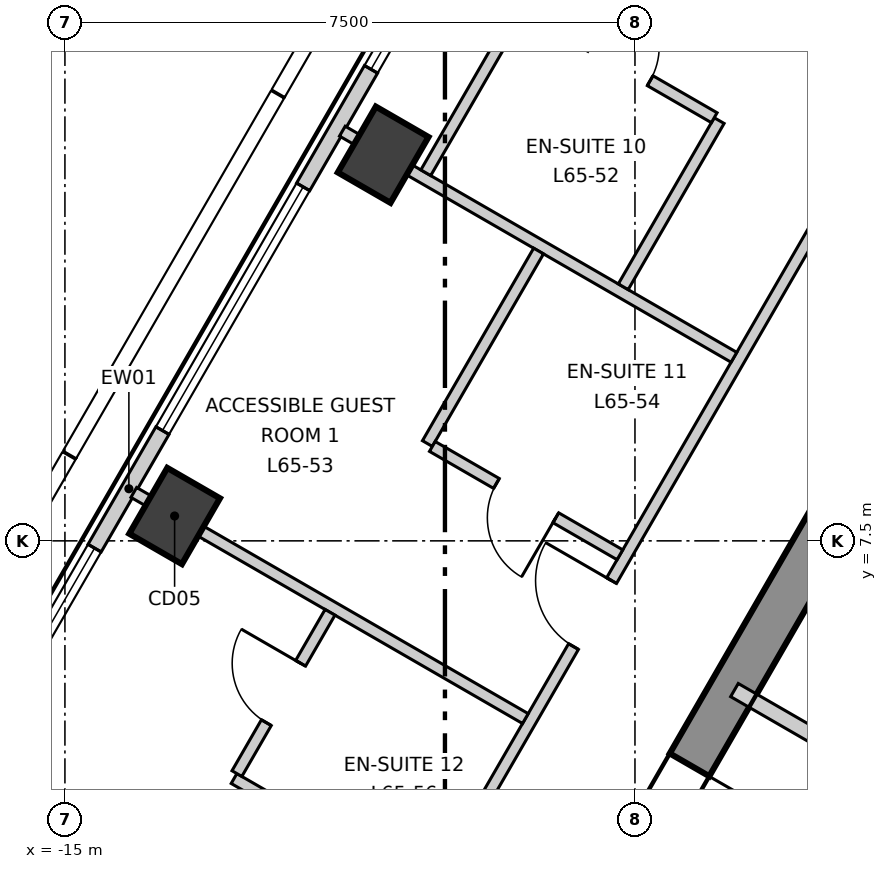
"""IFC4 building model, lengths in metres.
Left out: names, types, materials, properties, quantities, classifications, styles, units other than length and angle.
Written with IfcOpenShell. Run it as: python <this file> out.ifc"""

import sys

from ifc_helpers import new_model, si_unit, direction, frame, frame_2d, origin, origin_2d, place, context, subcontext, project, spatial, polyline, rectangle, outline, extrude, element, fill, save


model = new_model("IFC4")
c1 = context("Model", 3, precision=1e-05, world=origin(), true_north=direction((0.0, 1.0)))
c2 = subcontext(c1, "Body", "Model", "MODEL_VIEW")
j1 = project(units=[si_unit("LENGTHUNIT", "METRE"), si_unit("PLANEANGLEUNIT", "RADIAN")], contexts=[c1])
p1 = place(None, origin())
s1 = spatial("IfcSite", under=j1, at=p1, CompositionType="ELEMENT")
p2 = place(p1, origin())
s2 = spatial("IfcBuilding", under=s1, at=p2, CompositionType="ELEMENT")
p3 = place(p2, frame((0.0, 0.0, 279.1)))
s3 = spatial("IfcBuildingStorey", under=s2, at=p3, CompositionType="ELEMENT", Elevation=279.1)
p4 = place(p3, frame((-1.732, 13.3, -0.3), z_axis=(0.0, 0.0, 1.0), x_axis=(-0.500000539815, -0.866025092122, 0.0)))
e1 = element("IfcWall", 1, at=p4, inside=s3, PredefinedType="SHEAR", context=c2, shape_type="SweptSolid", body=[
    extrude(outline(polyline([(-0.173, -0.3), (1.795, -0.3), (3.763, -0.3), (5.732, -0.3), (7.7, -0.3), (9.668, -0.301), (11.637, -0.301), (13.605, -0.301), (15.573, -0.301), (17.542, -0.301), (19.51, -0.301), (21.478, -0.301), (21.131, 0.3), (19.226, 0.3), (17.321, 0.3), (15.415, 0.3), (13.51, 0.3), (11.605, 0.3), (9.699, 0.3), (7.794, 0.3), (5.889, 0.3), (3.984, 0.3), (2.078, 0.3), (0.173, 0.3), (-0.173, -0.3)])), origin(), (0.0, 0.0, 1.0), 3.6),
])
p5 = place(p4, frame((10.102, 0.0, 0.3)))
e2 = element("IfcOpeningElement", 2, at=p5, cuts=e1, PredefinedType="OPENING", context=c2, shape_type="SweptSolid", body=[
    extrude(rectangle(XDim=1.1, YDim=2.1, at=frame_2d((0.55, 1.05))), frame((0.0, 0.31, 0.0), z_axis=(0.0, -1.0, 0.0), x_axis=(1.0, 0.0, 0.0)), (0.0, 0.0, 1.0), 0.621),
])
p6 = place(p4, frame((15.627, 0.0, 0.3)))
e3 = element("IfcOpeningElement", 3, at=p6, cuts=e1, PredefinedType="OPENING", context=c2, shape_type="SweptSolid", body=[
    extrude(rectangle(XDim=0.9, YDim=2.1, at=frame_2d((0.45, 1.05))), frame((0.0, 0.31, 0.0), z_axis=(0.0, -1.0, 0.0), x_axis=(1.0, 0.0, 0.0)), (0.0, 0.0, 1.0), 0.621),
])
for number, where, z_axis, x_axis in (
    (4, (-10.813, 12.58, -0.3), (0.0, 0.0, 1.0), (0.5, 0.866, 0.0)),
    (5, (-13.557, 7.827, -0.3), (0.0, 0.0, 1.0), (0.5, 0.866, 0.0)),
):
    element("IfcColumn", number, at=place(p3, frame(where, z_axis=z_axis, x_axis=x_axis)), inside=s3, PredefinedType="COLUMN", context=c2, shape_type="SweptSolid", body=[
        extrude(rectangle(XDim=1.0, YDim=0.8, at=origin_2d()), origin(), (0.0, 0.0, 1.0), 3.6),
    ])
p7 = place(p3, frame((-2.536, 28.316, 0.0), z_axis=(0.0, 0.0, 1.0), x_axis=(-0.500006870765, -0.86602143691, 0.0)))
e6 = element("IfcWall", 6, at=p7, inside=s3, PredefinedType="ELEMENTEDWALL", context=c2, shape_type="SweptSolid", body=[
    extrude(rectangle(XDim=46.49, YDim=0.2, at=frame_2d((23.245, 0.0))), origin(), (0.0, 0.0, 1.0), 3.3),
])
p8 = place(p7, frame((2.196, 0.0, 0.9)))
e7 = element("IfcOpeningElement", 7, at=p8, cuts=e6, PredefinedType="OPENING", context=c2, shape_type="SweptSolid", body=[
    extrude(rectangle(XDim=3.7, YDim=2.2, at=frame_2d((1.85, 1.1))), frame((0.0, 0.11, 0.0), z_axis=(0.0, -1.0, 0.0), x_axis=(1.0, 0.0, 0.0)), (0.0, 0.0, 1.0), 0.22),
])
p9 = place(p7, frame((7.684, 0.0, 0.9)))
e8 = element("IfcOpeningElement", 8, at=p9, cuts=e6, PredefinedType="OPENING", context=c2, shape_type="SweptSolid", body=[
    extrude(rectangle(XDim=3.7, YDim=2.2, at=frame_2d((1.85, 1.1))), frame((0.0, 0.11, 0.0), z_axis=(0.0, -1.0, 0.0), x_axis=(1.0, 0.0, 0.0)), (0.0, 0.0, 1.0), 0.22),
])
p10 = place(p7, frame((13.172, 0.0, 0.9)))
e9 = element("IfcOpeningElement", 9, at=p10, cuts=e6, PredefinedType="OPENING", context=c2, shape_type="SweptSolid", body=[
    extrude(rectangle(XDim=3.7, YDim=2.2, at=frame_2d((1.85, 1.1))), frame((0.0, 0.11, 0.0), z_axis=(0.0, -1.0, 0.0), x_axis=(1.0, 0.0, 0.0)), (0.0, 0.0, 1.0), 0.22),
])
p11 = place(p7, frame((18.66, 0.0, 0.9)))
e10 = element("IfcOpeningElement", 10, at=p11, cuts=e6, PredefinedType="OPENING", context=c2, shape_type="SweptSolid", body=[
    extrude(rectangle(XDim=3.7, YDim=2.2, at=frame_2d((1.85, 1.1))), frame((0.0, 0.11, 0.0), z_axis=(0.0, -1.0, 0.0), x_axis=(1.0, 0.0, 0.0)), (0.0, 0.0, 1.0), 0.22),
])
p12 = place(p7, frame((24.148, 0.0, 0.9)))
e11 = element("IfcOpeningElement", 11, at=p12, cuts=e6, PredefinedType="OPENING", context=c2, shape_type="SweptSolid", body=[
    extrude(rectangle(XDim=3.7, YDim=2.2, at=frame_2d((1.85, 1.1))), frame((0.0, 0.11, 0.0), z_axis=(0.0, -1.0, 0.0), x_axis=(1.0, 0.0, 0.0)), (0.0, 0.0, 1.0), 0.22),
])
p13 = place(p7, frame((29.636, 0.0, 0.9)))
e12 = element("IfcOpeningElement", 12, at=p13, cuts=e6, PredefinedType="OPENING", context=c2, shape_type="SweptSolid", body=[
    extrude(rectangle(XDim=3.7, YDim=2.2, at=frame_2d((1.85, 1.1))), frame((0.0, 0.11, 0.0), z_axis=(0.0, -1.0, 0.0), x_axis=(1.0, 0.0, 0.0)), (0.0, 0.0, 1.0), 0.22),
])
p14 = place(p7, frame((35.124, 0.0, 0.9)))
e13 = element("IfcOpeningElement", 13, at=p14, cuts=e6, PredefinedType="OPENING", context=c2, shape_type="SweptSolid", body=[
    extrude(rectangle(XDim=3.7, YDim=2.2, at=frame_2d((1.85, 1.1))), frame((0.0, 0.11, 0.0), z_axis=(0.0, -1.0, 0.0), x_axis=(1.0, 0.0, 0.0)), (0.0, 0.0, 1.0), 0.22),
])
p15 = place(p7, frame((40.612, 0.0, 0.9)))
e14 = element("IfcOpeningElement", 14, at=p15, cuts=e6, PredefinedType="OPENING", context=c2, shape_type="SweptSolid", body=[
    extrude(rectangle(XDim=3.7, YDim=2.2, at=frame_2d((1.85, 1.1))), frame((0.0, 0.11, 0.0), z_axis=(0.0, -1.0, 0.0), x_axis=(1.0, 0.0, 0.0)), (0.0, 0.0, 1.0), 0.22),
])
p16 = place(p3, frame((-17.678, -10.119, 0.0), z_axis=(0.0, 0.0, 1.0), x_axis=(0.500003190174, 0.866023561929, 0.0)))
e15 = element("IfcWall", 15, at=p16, inside=s3, PredefinedType="PARTITIONING", context=c2, shape_type="SweptSolid", body=[
    extrude(rectangle(XDim=35.356, YDim=0.15, at=frame_2d((17.678, 0.0))), origin(), (0.0, 0.0, 1.0), 3.3),
])
p17 = place(p16, frame((28.706, 0.0, 0.0)))
e16 = element("IfcOpeningElement", 16, at=p17, cuts=e15, PredefinedType="OPENING", context=c2, shape_type="SweptSolid", body=[
    extrude(rectangle(XDim=1.0, YDim=2.1, at=frame_2d((0.5, 1.05))), frame((0.0, 0.085, 0.0), z_axis=(0.0, -1.0, 0.0), x_axis=(1.0, 0.0, 0.0)), (0.0, 0.0, 1.0), 0.17),
])
p18 = place(p16, frame((18.74, 0.0, 0.0)))
e17 = element("IfcOpeningElement", 17, at=p18, cuts=e15, PredefinedType="OPENING", context=c2, shape_type="SweptSolid", body=[
    extrude(rectangle(XDim=1.0, YDim=2.1, at=frame_2d((0.5, 1.05))), frame((0.0, 0.085, 0.0), z_axis=(0.0, -1.0, 0.0), x_axis=(1.0, 0.0, 0.0)), (0.0, 0.0, 1.0), 0.17),
])
p19 = place(p16, frame((9.352, 0.0, 0.0)))
e18 = element("IfcOpeningElement", 18, at=p19, cuts=e15, PredefinedType="OPENING", context=c2, shape_type="SweptSolid", body=[
    extrude(rectangle(XDim=1.0, YDim=2.1, at=frame_2d((0.5, 1.05))), frame((0.0, 0.085, 0.0), z_axis=(0.0, -1.0, 0.0), x_axis=(1.0, 0.0, 0.0)), (0.0, 0.0, 1.0), 0.17),
])
p20 = place(p16, frame((2.777, 0.0, 0.0)))
e19 = element("IfcOpeningElement", 19, at=p20, cuts=e15, PredefinedType="OPENING", context=c2, shape_type="SweptSolid", body=[
    extrude(rectangle(XDim=1.0, YDim=2.1, at=frame_2d((0.5, 1.05))), frame((0.0, 0.085, 0.0), z_axis=(0.0, -1.0, 0.0), x_axis=(1.0, 0.0, 0.0)), (0.0, 0.0, 1.0), 0.17),
])
p21 = place(p3, frame((-14.094, 8.137, 0.0), z_axis=(0.0, 0.0, 1.0), x_axis=(0.866004483474, -0.50003623329, 0.0)))
e20 = element("IfcWall", 20, at=p21, inside=s3, PredefinedType="PARTITIONING", context=c2, shape_type="SweptSolid", body=[
    extrude(rectangle(XDim=5.949, YDim=0.15, at=frame_2d((2.975, 0.0))), origin(), (0.0, 0.0, 1.0), 2.8),
])
p22 = place(p3, frame((-11.35, 12.89, 0.0), z_axis=(0.0, 0.0, 1.0), x_axis=(0.866004483474, -0.50003623329, 0.0)))
e21 = element("IfcWall", 21, at=p22, inside=s3, PredefinedType="PARTITIONING", context=c2, shape_type="SweptSolid", body=[
    extrude(rectangle(XDim=5.949, YDim=0.15, at=frame_2d((2.975, 0.0))), origin(), (0.0, 0.0, 1.0), 3.3),
])
for number, where, z_axis, x_axis in (
    (22, (-7.654, 10.843, 0.0), (0.0, 0.0, 1.0), (0.5, 0.866, 0.0)),
    (23, (-10.252, 12.343, 0.0), (0.0, 0.0, 1.0), (0.5, 0.866, 0.0)),
):
    element("IfcWall", number, at=place(p3, frame(where, z_axis=z_axis, x_axis=x_axis)), inside=s3, PredefinedType="PARTITIONING", context=c2, shape_type="SweptSolid", body=[
        extrude(rectangle(XDim=2.524, YDim=0.15, at=frame_2d((1.262, 0.0))), origin(), (0.0, 0.0, 1.0), 3.3),
    ])
p23 = place(p3, frame((-12.775, 4.373, 0.0), z_axis=(0.0, 0.0, 1.0), x_axis=(0.866061874444, -0.499936825643, 0.0)))
e24 = element("IfcWall", 24, at=p23, inside=s3, PredefinedType="PARTITIONING", context=c2, shape_type="SweptSolid", body=[
    extrude(rectangle(XDim=2.925, YDim=0.15, at=frame_2d((1.462, 0.0))), origin(), (0.0, 0.0, 1.0), 3.3),
])
p24 = place(p3, frame((-12.737, 4.438, 0.0), z_axis=(0.0, 0.0, 1.0), x_axis=(0.499975448907, 0.8660395779, 0.0)))
e25 = element("IfcWall", 25, at=p24, inside=s3, PredefinedType="PARTITIONING", context=c2, shape_type="SweptSolid", body=[
    extrude(rectangle(XDim=2.45, YDim=0.15, at=frame_2d((1.225, 0.0))), origin(), (0.0, 0.0, 1.0), 3.3),
])
p25 = place(p24, frame((0.775, 0.0, 0.0)))
e26 = element("IfcOpeningElement", 26, at=p25, cuts=e25, PredefinedType="OPENING", context=c2, shape_type="SweptSolid", body=[
    extrude(rectangle(XDim=0.9, YDim=2.1, at=frame_2d((0.45, 1.05))), frame((0.0, 0.085, 0.0), z_axis=(0.0, -1.0, 0.0), x_axis=(1.0, 0.0, 0.0)), (0.0, 0.0, 1.0), 0.17),
])
p26 = place(p3, frame((-10.231, 8.78, 0.0), z_axis=(0.0, 0.0, 1.0), x_axis=(0.500124626836, 0.865953438489, 0.0)))
e27 = element("IfcWall", 27, at=p26, inside=s3, PredefinedType="PARTITIONING", context=c2, shape_type="SweptSolid", body=[
    extrude(rectangle(XDim=2.925, YDim=0.15, at=frame_2d((1.462, 0.0))), origin(), (0.0, 0.0, 1.0), 3.3),
])
p27 = place(p3, frame((-10.166, 8.742, 0.0), z_axis=(0.0, 0.0, 1.0), x_axis=(0.866004402611, -0.500036373335, 0.0)))
e28 = element("IfcWall", 28, at=p27, inside=s3, PredefinedType="PARTITIONING", context=c2, shape_type="SweptSolid", body=[
    extrude(rectangle(XDim=2.85, YDim=0.15, at=frame_2d((1.425, 0.0))), origin(), (0.0, 0.0, 1.0), 3.3),
])
p28 = place(p27, frame((0.975, 0.0, 0.0)))
e29 = element("IfcOpeningElement", 29, at=p28, cuts=e28, PredefinedType="OPENING", context=c2, shape_type="SweptSolid", body=[
    extrude(rectangle(XDim=0.9, YDim=2.1, at=frame_2d((0.45, 1.05))), frame((0.0, 0.085, 0.0), z_axis=(0.0, -1.0, 0.0), x_axis=(1.0, 0.0, 0.0)), (0.0, 0.0, 1.0), 0.17),
])
p29 = place(p3, frame((-8.925, 14.492, 0.0), z_axis=(0.0, 0.0, 1.0), x_axis=(0.866004402611, -0.500036373335, 0.0)))
e30 = element("IfcWall", 30, at=p29, inside=s3, PredefinedType="PARTITIONING", context=c2, shape_type="SweptSolid", body=[
    extrude(rectangle(XDim=2.85, YDim=0.15, at=frame_2d((1.425, 0.0))), origin(), (0.0, 0.0, 1.0), 3.3),
])
p30 = place(p29, frame((0.975, 0.0, 0.0)))
e31 = element("IfcOpeningElement", 31, at=p30, cuts=e30, PredefinedType="OPENING", context=c2, shape_type="SweptSolid", body=[
    extrude(rectangle(XDim=0.9, YDim=2.1, at=frame_2d((0.45, 1.05))), frame((0.0, 0.085, 0.0), z_axis=(0.0, -1.0, 0.0), x_axis=(1.0, 0.0, 0.0)), (0.0, 0.0, 1.0), 0.17),
])
p31 = place(p3, frame((-6.191, 5.537, 0.0), z_axis=(0.0, 0.0, 1.0), x_axis=(0.866052607023, -0.499952879648, 0.0)))
e32 = element("IfcWall", 32, at=p31, inside=s3, PredefinedType="SOLIDWALL", context=c2, shape_type="SweptSolid", body=[
    extrude(rectangle(XDim=3.332, YDim=0.2, at=frame_2d((1.666, 0.0))), origin(), (0.0, 0.0, 1.0), 3.3),
])
p32 = place(p31, frame((1.83, 0.0, 0.0)))
e33 = element("IfcOpeningElement", 33, at=p32, cuts=e32, PredefinedType="OPENING", context=c2, shape_type="SweptSolid", body=[
    extrude(rectangle(XDim=0.9, YDim=2.1, at=frame_2d((0.45, 1.05))), frame((0.0, 0.11, 0.0), z_axis=(0.0, -1.0, 0.0), x_axis=(1.0, 0.0, 0.0)), (0.0, 0.0, 1.0), 0.22),
])
p33 = place(p10, origin())
e34 = element("IfcWindow", 34, at=p33, inside=s3, PartitioningType="SINGLE_PANEL", PredefinedType="WINDOW", context=c2, shape_type="SweptSolid", body=[
    extrude(rectangle(XDim=3.7, YDim=2.2, at=frame_2d((1.85, 1.1))), frame((0.0, 0.03, 0.0), z_axis=(0.0, -1.0, 0.0), x_axis=(1.0, 0.0, 0.0)), (0.0, 0.0, 1.0), 0.06),
])
fill(e9, e34)
p34 = place(p11, origin())
e35 = element("IfcWindow", 35, at=p34, inside=s3, PartitioningType="SINGLE_PANEL", PredefinedType="WINDOW", context=c2, shape_type="SweptSolid", body=[
    extrude(rectangle(XDim=3.7, YDim=2.2, at=frame_2d((1.85, 1.1))), frame((0.0, 0.03, 0.0), z_axis=(0.0, -1.0, 0.0), x_axis=(1.0, 0.0, 0.0)), (0.0, 0.0, 1.0), 0.06),
])
fill(e10, e35)
p35 = place(p12, origin())
e36 = element("IfcWindow", 36, at=p35, inside=s3, PartitioningType="SINGLE_PANEL", PredefinedType="WINDOW", context=c2, shape_type="SweptSolid", body=[
    extrude(rectangle(XDim=3.7, YDim=2.2, at=frame_2d((1.85, 1.1))), frame((0.0, 0.03, 0.0), z_axis=(0.0, -1.0, 0.0), x_axis=(1.0, 0.0, 0.0)), (0.0, 0.0, 1.0), 0.06),
])
fill(e11, e36)
p36 = place(p30, origin())
e37 = element("IfcDoor", 37, at=p36, inside=s3, OperationType="SINGLE_SWING_RIGHT", PredefinedType="DOOR", context=c2, shape_type="SweptSolid", body=[
    extrude(rectangle(XDim=0.9, YDim=2.1, at=frame_2d((0.45, 1.05))), frame((0.0, 0.025, 0.0), z_axis=(0.0, -1.0, 0.0), x_axis=(1.0, 0.0, 0.0)), (0.0, 0.0, 1.0), 0.05),
])
fill(e31, e37)
p37 = place(p18, origin())
e38 = element("IfcDoor", 38, at=p37, inside=s3, OperationType="SINGLE_SWING_LEFT", PredefinedType="DOOR", context=c2, shape_type="SweptSolid", body=[
    extrude(rectangle(XDim=1.0, YDim=2.1, at=frame_2d((0.5, 1.05))), frame((0.0, 0.025, 0.0), z_axis=(0.0, -1.0, 0.0), x_axis=(1.0, 0.0, 0.0)), (0.0, 0.0, 1.0), 0.05),
])
fill(e17, e38)
p38 = place(p28, origin())
e39 = element("IfcDoor", 39, at=p38, inside=s3, OperationType="SINGLE_SWING_RIGHT", PredefinedType="DOOR", context=c2, shape_type="SweptSolid", body=[
    extrude(rectangle(XDim=0.9, YDim=2.1, at=frame_2d((0.45, 1.05))), frame((0.0, 0.025, 0.0), z_axis=(0.0, -1.0, 0.0), x_axis=(1.0, 0.0, 0.0)), (0.0, 0.0, 1.0), 0.05),
])
fill(e29, e39)
p39 = place(p25, origin())
e40 = element("IfcDoor", 40, at=p39, inside=s3, OperationType="SINGLE_SWING_LEFT", PredefinedType="DOOR", context=c2, shape_type="SweptSolid", body=[
    extrude(rectangle(XDim=0.9, YDim=2.1, at=frame_2d((0.45, 1.05))), frame((0.0, 0.025, 0.0), z_axis=(0.0, -1.0, 0.0), x_axis=(1.0, 0.0, 0.0)), (0.0, 0.0, 1.0), 0.05),
])
fill(e26, e40)
p40 = place(p5, origin())
e41 = element("IfcDoor", 41, at=p40, inside=s3, OperationType="SINGLE_SWING_RIGHT", PredefinedType="DOOR", context=c2, shape_type="SweptSolid", body=[
    extrude(rectangle(XDim=1.1, YDim=2.1, at=frame_2d((0.55, 1.05))), frame((0.0, 0.025, 0.0), z_axis=(0.0, -1.0, 0.0), x_axis=(1.0, 0.0, 0.0)), (0.0, 0.0, 1.0), 0.05),
])
fill(e2, e41)
save(model, sys.argv[1])
